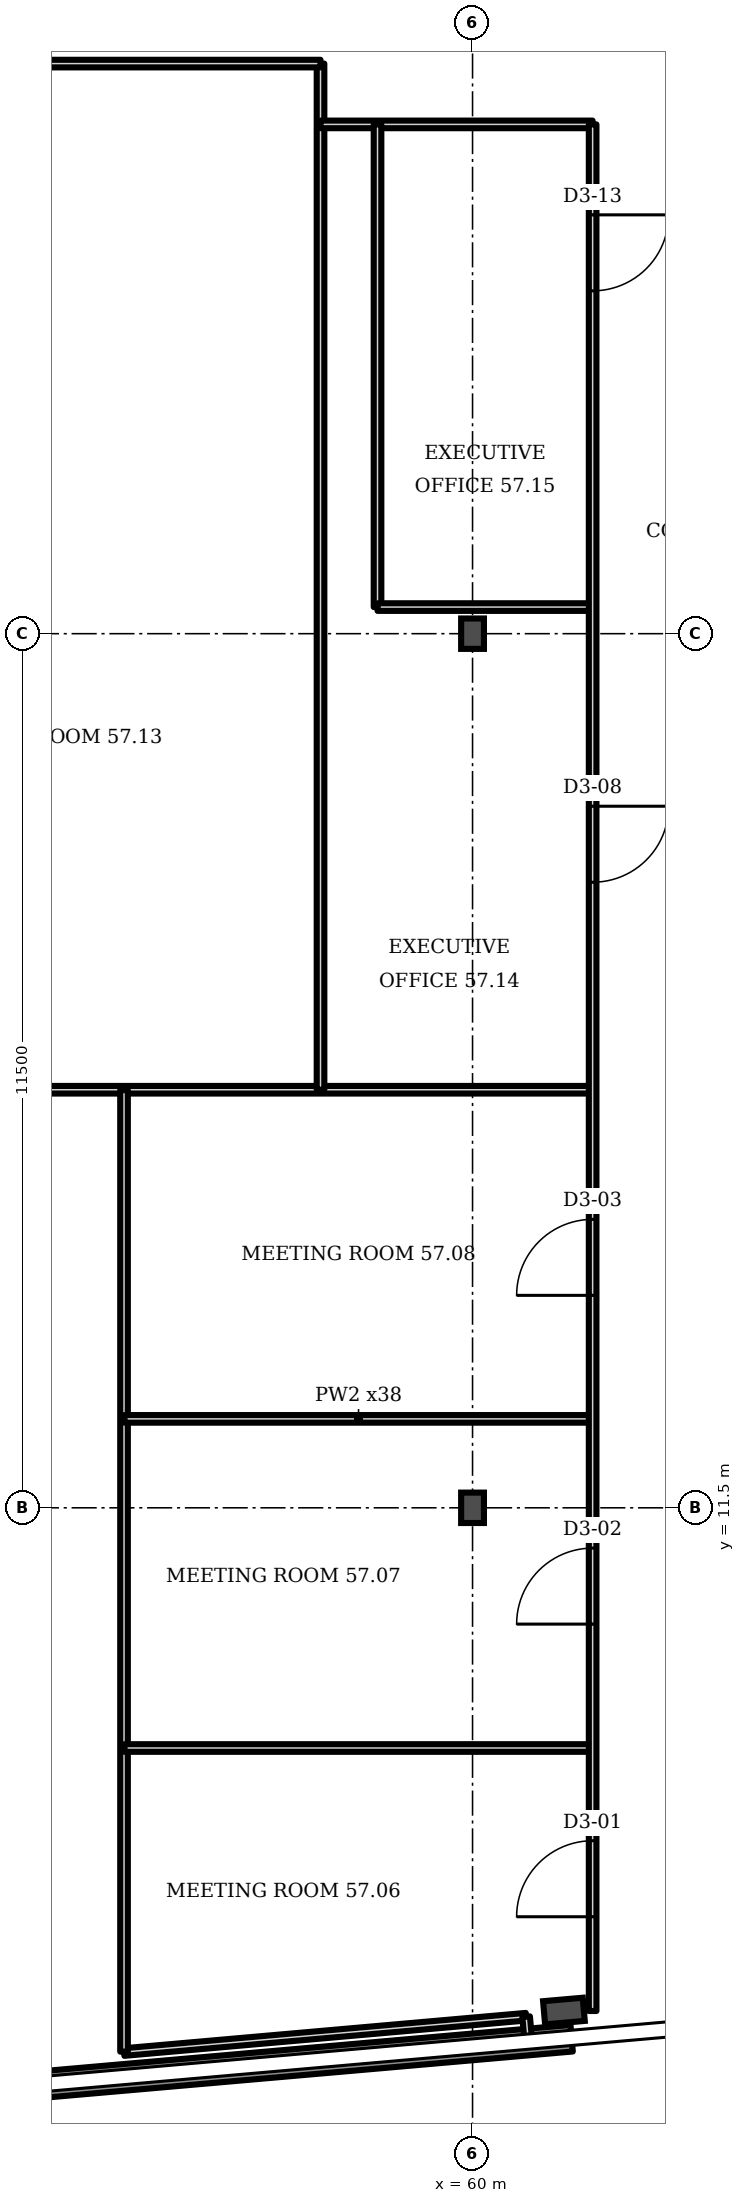
"""IFC4 building model, lengths in metres.
Left out: names, types, materials, properties, quantities, classifications, styles, units other than length and angle.
Written with IfcOpenShell. Run it as: python <this file> out.ifc"""

import sys

from ifc_helpers import new_model, si_unit, direction, frame, frame_2d, origin, origin_2d, place, context, subcontext, project, spatial, rectangle, i_section, extrude, element, fill, save


model = new_model("IFC4")
c1 = context("Model", 3, precision=1e-05, world=origin(), true_north=direction((0.0, 1.0)))
c2 = subcontext(c1, "Body", "Model", "MODEL_VIEW")
j1 = project(units=[si_unit("LENGTHUNIT", "METRE"), si_unit("PLANEANGLEUNIT", "RADIAN")], contexts=[c1])
p1 = place(None, origin())
s1 = spatial("IfcSite", under=j1, at=p1, CompositionType="ELEMENT")
p2 = place(p1, origin())
s2 = spatial("IfcBuilding", under=s1, at=p2, CompositionType="ELEMENT")
p3 = place(p2, frame((0.0, 0.0, 228.7)))
s3 = spatial("IfcBuildingStorey", under=s2, at=p3, CompositionType="ELEMENT", Elevation=228.7)
p4 = place(p3, frame((61.202, 4.879, 0.0), z_axis=(0.0, 0.0, 1.0), x_axis=(0.087156, -0.996197, 0.0)))
e1 = element("IfcColumn", 1, at=p4, inside=s3, PredefinedType="COLUMN", context=c2, shape_type="SweptSolid", body=[
    extrude(i_section(OverallWidth=0.306, OverallDepth=0.524, WebThickness=0.021, FlangeThickness=0.04, FilletRadius=0.027, at=origin_2d()), origin(), (0.0, 0.0, 1.0), 3.6),
])
for number, where, z_axis, x_axis in (
    (2, (60.0, 11.5, 0.0), (0.0, 0.0, 1.0), (1.0, 0.0, 0.0)),
    (3, (60.0, 23.0, 0.0), (0.0, 0.0, 1.0), (1.0, 0.0, 0.0)),
):
    element("IfcColumn", number, at=place(p3, frame(where, z_axis=z_axis, x_axis=x_axis)), inside=s3, PredefinedType="COLUMN", context=c2, shape_type="SweptSolid", body=[
        extrude(i_section(OverallWidth=0.3, OverallDepth=0.4, WebThickness=0.013, FlangeThickness=0.024, FilletRadius=0.027, at=origin_2d()), origin(), (0.0, 0.0, 1.0), 3.6),
    ])
p5 = place(p3, frame((49.545, 3.493, 0.0), z_axis=(0.0, 0.0, 1.0), x_axis=(0.996196, 0.087141, 0.0)))
e4 = element("IfcWall", 4, at=p5, inside=s3, PredefinedType="SOLIDWALL", context=c2, shape_type="SweptSolid", body=[
    extrude(rectangle(XDim=11.803, YDim=0.35, at=frame_2d((5.902, 0.0))), origin(), (0.0, 0.0, 1.0), 1.0),
])
p6 = place(p3, frame((39.04, 17.0, 0.0), z_axis=(0.0, 0.0, 1.0), x_axis=(1.0, 0.0, 0.0)))
e5 = element("IfcWall", 5, at=p6, inside=s3, PredefinedType="PARTITIONING", context=c2, shape_type="SweptSolid", body=[
    extrude(rectangle(XDim=22.54, YDim=0.1, at=frame_2d((11.27, 0.0))), origin(), (0.0, 0.0, 1.0), 3.2),
])
p7 = place(p3, frame((55.415, 4.34, 0.0), z_axis=(0.0, 0.0, 1.0), x_axis=(0.996159, 0.087534, 0.0)))
e6 = element("IfcWall", 6, at=p7, inside=s3, PredefinedType="PARTITIONING", context=c2, shape_type="SweptSolid", body=[
    extrude(rectangle(XDim=5.31, YDim=0.1, at=frame_2d((2.655, 0.0))), origin(), (0.0, 0.0, 1.0), 2.58),
])
p8 = place(p3, frame((55.415, 4.345, 0.0), z_axis=(0.0, 0.0, 1.0), x_axis=(0.0, 1.0, 0.0)))
e7 = element("IfcWall", 7, at=p8, inside=s3, PredefinedType="PARTITIONING", context=c2, shape_type="SweptSolid", body=[
    extrude(rectangle(XDim=12.65, YDim=0.1, at=frame_2d((6.325, 0.0))), origin(), (0.0, 0.0, 1.0), 3.2),
])
for number, where, z_axis, x_axis in (
    (8, (55.42, 8.34, 0.0), (0.0, 0.0, 1.0), (1.0, 0.0, 0.0)),
    (9, (55.42, 12.67, 0.0), (0.0, 0.0, 1.0), (1.0, 0.0, 0.0)),
):
    element("IfcWall", number, at=place(p3, frame(where, z_axis=z_axis, x_axis=x_axis)), inside=s3, PredefinedType="PARTITIONING", context=c2, shape_type="SweptSolid", body=[
        extrude(rectangle(XDim=6.16, YDim=0.1, at=frame_2d((3.08, 0.0))), origin(), (0.0, 0.0, 1.0), 3.2),
    ])
p9 = place(p3, frame((58.0, 17.0, 0.0), z_axis=(0.0, 0.0, 1.0), x_axis=(0.0, 1.0, 0.0)))
e10 = element("IfcWall", 10, at=p9, inside=s3, PredefinedType="PARTITIONING", context=c2, shape_type="SweptSolid", body=[
    extrude(rectangle(XDim=13.5, YDim=0.1, at=frame_2d((6.75, 0.0))), origin(), (0.0, 0.0, 1.0), 3.2),
])
p10 = place(p3, frame((58.0, 29.7, 0.0), z_axis=(0.0, 0.0, 1.0), x_axis=(1.0, 0.0, 0.0)))
e11 = element("IfcWall", 11, at=p10, inside=s3, PredefinedType="PARTITIONING", context=c2, shape_type="SweptSolid", body=[
    extrude(rectangle(XDim=3.58, YDim=0.1, at=frame_2d((1.79, 0.0))), origin(), (0.0, 0.0, 1.0), 3.2),
])
p11 = place(p3, frame((58.75, 23.35, 0.0), z_axis=(0.0, 0.0, 1.0), x_axis=(0.0, 1.0, 0.0)))
e12 = element("IfcWall", 12, at=p11, inside=s3, PredefinedType="PARTITIONING", context=c2, shape_type="SweptSolid", body=[
    extrude(rectangle(XDim=6.35, YDim=0.1, at=frame_2d((3.175, 0.0))), origin(), (0.0, 0.0, 1.0), 3.2),
])
p12 = place(p3, frame((58.75, 23.35, 0.0), z_axis=(0.0, 0.0, 1.0), x_axis=(1.0, 0.0, 0.0)))
e13 = element("IfcWall", 13, at=p12, inside=s3, PredefinedType="PARTITIONING", context=c2, shape_type="SweptSolid", body=[
    extrude(rectangle(XDim=2.83, YDim=0.1, at=frame_2d((1.415, 0.0))), origin(), (0.0, 0.0, 1.0), 3.2),
])
p13 = place(p3, frame((60.733, 4.497, 0.0), z_axis=(0.0, 0.0, 1.0), x_axis=(-0.090037, 0.995936, 0.0)))
e14 = element("IfcWall", 14, at=p13, inside=s3, PredefinedType="PARTITIONING", context=c2, shape_type="SweptSolid", body=[
    extrude(rectangle(XDim=0.309, YDim=0.1, at=frame_2d((0.155, 0.0))), origin(), (0.0, 0.0, 1.0), 3.2),
])
p14 = place(p3, frame((61.58, 4.88, 0.0), z_axis=(0.0, 0.0, 1.0), x_axis=(0.0, 1.0, 0.0)))
e15 = element("IfcWall", 15, at=p14, inside=s3, PredefinedType="PARTITIONING", context=c2, shape_type="SweptSolid", body=[
    extrude(rectangle(XDim=24.82, YDim=0.1, at=frame_2d((12.41, 0.0))), origin(), (0.0, 0.0, 1.0), 3.2),
])
p15 = place(p14, frame((1.24, 0.0, 0.0)))
e16 = element("IfcOpeningElement", 16, at=p15, cuts=e15, PredefinedType="OPENING", context=c2, shape_type="SweptSolid", body=[
    extrude(rectangle(XDim=1.0, YDim=2.1, at=frame_2d((0.5, 1.05))), frame((0.0, 0.06, 0.0), z_axis=(0.0, -1.0, 0.0), x_axis=(1.0, 0.0, 0.0)), (0.0, 0.0, 1.0), 0.12),
])
p16 = place(p14, frame((5.09, 0.0, 0.0)))
e17 = element("IfcOpeningElement", 17, at=p16, cuts=e15, PredefinedType="OPENING", context=c2, shape_type="SweptSolid", body=[
    extrude(rectangle(XDim=1.0, YDim=2.1, at=frame_2d((0.5, 1.05))), frame((0.0, 0.06, 0.0), z_axis=(0.0, -1.0, 0.0), x_axis=(1.0, 0.0, 0.0)), (0.0, 0.0, 1.0), 0.12),
])
p17 = place(p14, frame((9.415, 0.0, 0.0)))
e18 = element("IfcOpeningElement", 18, at=p17, cuts=e15, PredefinedType="OPENING", context=c2, shape_type="SweptSolid", body=[
    extrude(rectangle(XDim=1.0, YDim=2.1, at=frame_2d((0.5, 1.05))), frame((0.0, 0.06, 0.0), z_axis=(0.0, -1.0, 0.0), x_axis=(1.0, 0.0, 0.0)), (0.0, 0.0, 1.0), 0.12),
])
p18 = place(p14, frame((14.85, 0.0, 0.0)))
e19 = element("IfcOpeningElement", 19, at=p18, cuts=e15, PredefinedType="OPENING", context=c2, shape_type="SweptSolid", body=[
    extrude(rectangle(XDim=1.0, YDim=2.1, at=frame_2d((0.5, 1.05))), frame((0.0, 0.06, 0.0), z_axis=(0.0, -1.0, 0.0), x_axis=(1.0, 0.0, 0.0)), (0.0, 0.0, 1.0), 0.12),
])
p19 = place(p14, frame((22.63, 0.0, 0.0)))
e20 = element("IfcOpeningElement", 20, at=p19, cuts=e15, PredefinedType="OPENING", context=c2, shape_type="SweptSolid", body=[
    extrude(rectangle(XDim=1.0, YDim=2.1, at=frame_2d((0.5, 1.05))), frame((0.0, 0.06, 0.0), z_axis=(0.0, -1.0, 0.0), x_axis=(1.0, 0.0, 0.0)), (0.0, 0.0, 1.0), 0.12),
])
p20 = place(p3, frame((44.15, 30.5, 0.0), z_axis=(0.0, 0.0, 1.0), x_axis=(1.0, 0.0, 0.0)))
e21 = element("IfcWall", 21, at=p20, inside=s3, PredefinedType="PARTITIONING", context=c2, shape_type="SweptSolid", body=[
    extrude(rectangle(XDim=13.85, YDim=0.1, at=frame_2d((6.925, 0.0))), origin(), (0.0, 0.0, 1.0), 3.2),
])
p21 = place(p20, frame((6.77, 0.0, 0.0)))
e22 = element("IfcOpeningElement", 22, at=p21, cuts=e21, PredefinedType="OPENING", context=c2, shape_type="SweptSolid", body=[
    extrude(rectangle(XDim=1.0, YDim=2.1, at=frame_2d((0.5, 1.05))), frame((0.0, 0.06, 0.0), z_axis=(0.0, -1.0, 0.0), x_axis=(1.0, 0.0, 0.0)), (0.0, 0.0, 1.0), 0.12),
])
p22 = place(p15, origin())
e23 = element("IfcDoor", 23, at=p22, inside=s3, OperationType="SINGLE_SWING_LEFT", PredefinedType="DOOR", context=c2, shape_type="SweptSolid", body=[
    extrude(rectangle(XDim=1.0, YDim=2.1, at=frame_2d((0.5, 1.05))), frame((0.0, 0.025, 0.0), z_axis=(0.0, -1.0, 0.0), x_axis=(1.0, 0.0, 0.0)), (0.0, 0.0, 1.0), 0.05),
])
fill(e16, e23)
p23 = place(p16, origin())
e24 = element("IfcDoor", 24, at=p23, inside=s3, OperationType="SINGLE_SWING_LEFT", PredefinedType="DOOR", context=c2, shape_type="SweptSolid", body=[
    extrude(rectangle(XDim=1.0, YDim=2.1, at=frame_2d((0.5, 1.05))), frame((0.0, 0.025, 0.0), z_axis=(0.0, -1.0, 0.0), x_axis=(1.0, 0.0, 0.0)), (0.0, 0.0, 1.0), 0.05),
])
fill(e17, e24)
p24 = place(p17, origin())
e25 = element("IfcDoor", 25, at=p24, inside=s3, OperationType="SINGLE_SWING_LEFT", PredefinedType="DOOR", context=c2, shape_type="SweptSolid", body=[
    extrude(rectangle(XDim=1.0, YDim=2.1, at=frame_2d((0.5, 1.05))), frame((0.0, 0.025, 0.0), z_axis=(0.0, -1.0, 0.0), x_axis=(1.0, 0.0, 0.0)), (0.0, 0.0, 1.0), 0.05),
])
fill(e18, e25)
p25 = place(p18, origin())
e26 = element("IfcDoor", 26, at=p25, inside=s3, OperationType="SINGLE_SWING_RIGHT", PredefinedType="DOOR", context=c2, shape_type="SweptSolid", body=[
    extrude(rectangle(XDim=1.0, YDim=2.1, at=frame_2d((0.5, 1.05))), frame((0.0, 0.025, 0.0), z_axis=(0.0, -1.0, 0.0), x_axis=(1.0, 0.0, 0.0)), (0.0, 0.0, 1.0), 0.05),
])
fill(e19, e26)
p26 = place(p19, origin())
e27 = element("IfcDoor", 27, at=p26, inside=s3, OperationType="SINGLE_SWING_RIGHT", PredefinedType="DOOR", context=c2, shape_type="SweptSolid", body=[
    extrude(rectangle(XDim=1.0, YDim=2.1, at=frame_2d((0.5, 1.05))), frame((0.0, 0.025, 0.0), z_axis=(0.0, -1.0, 0.0), x_axis=(1.0, 0.0, 0.0)), (0.0, 0.0, 1.0), 0.05),
])
fill(e20, e27)
save(model, sys.argv[1])
